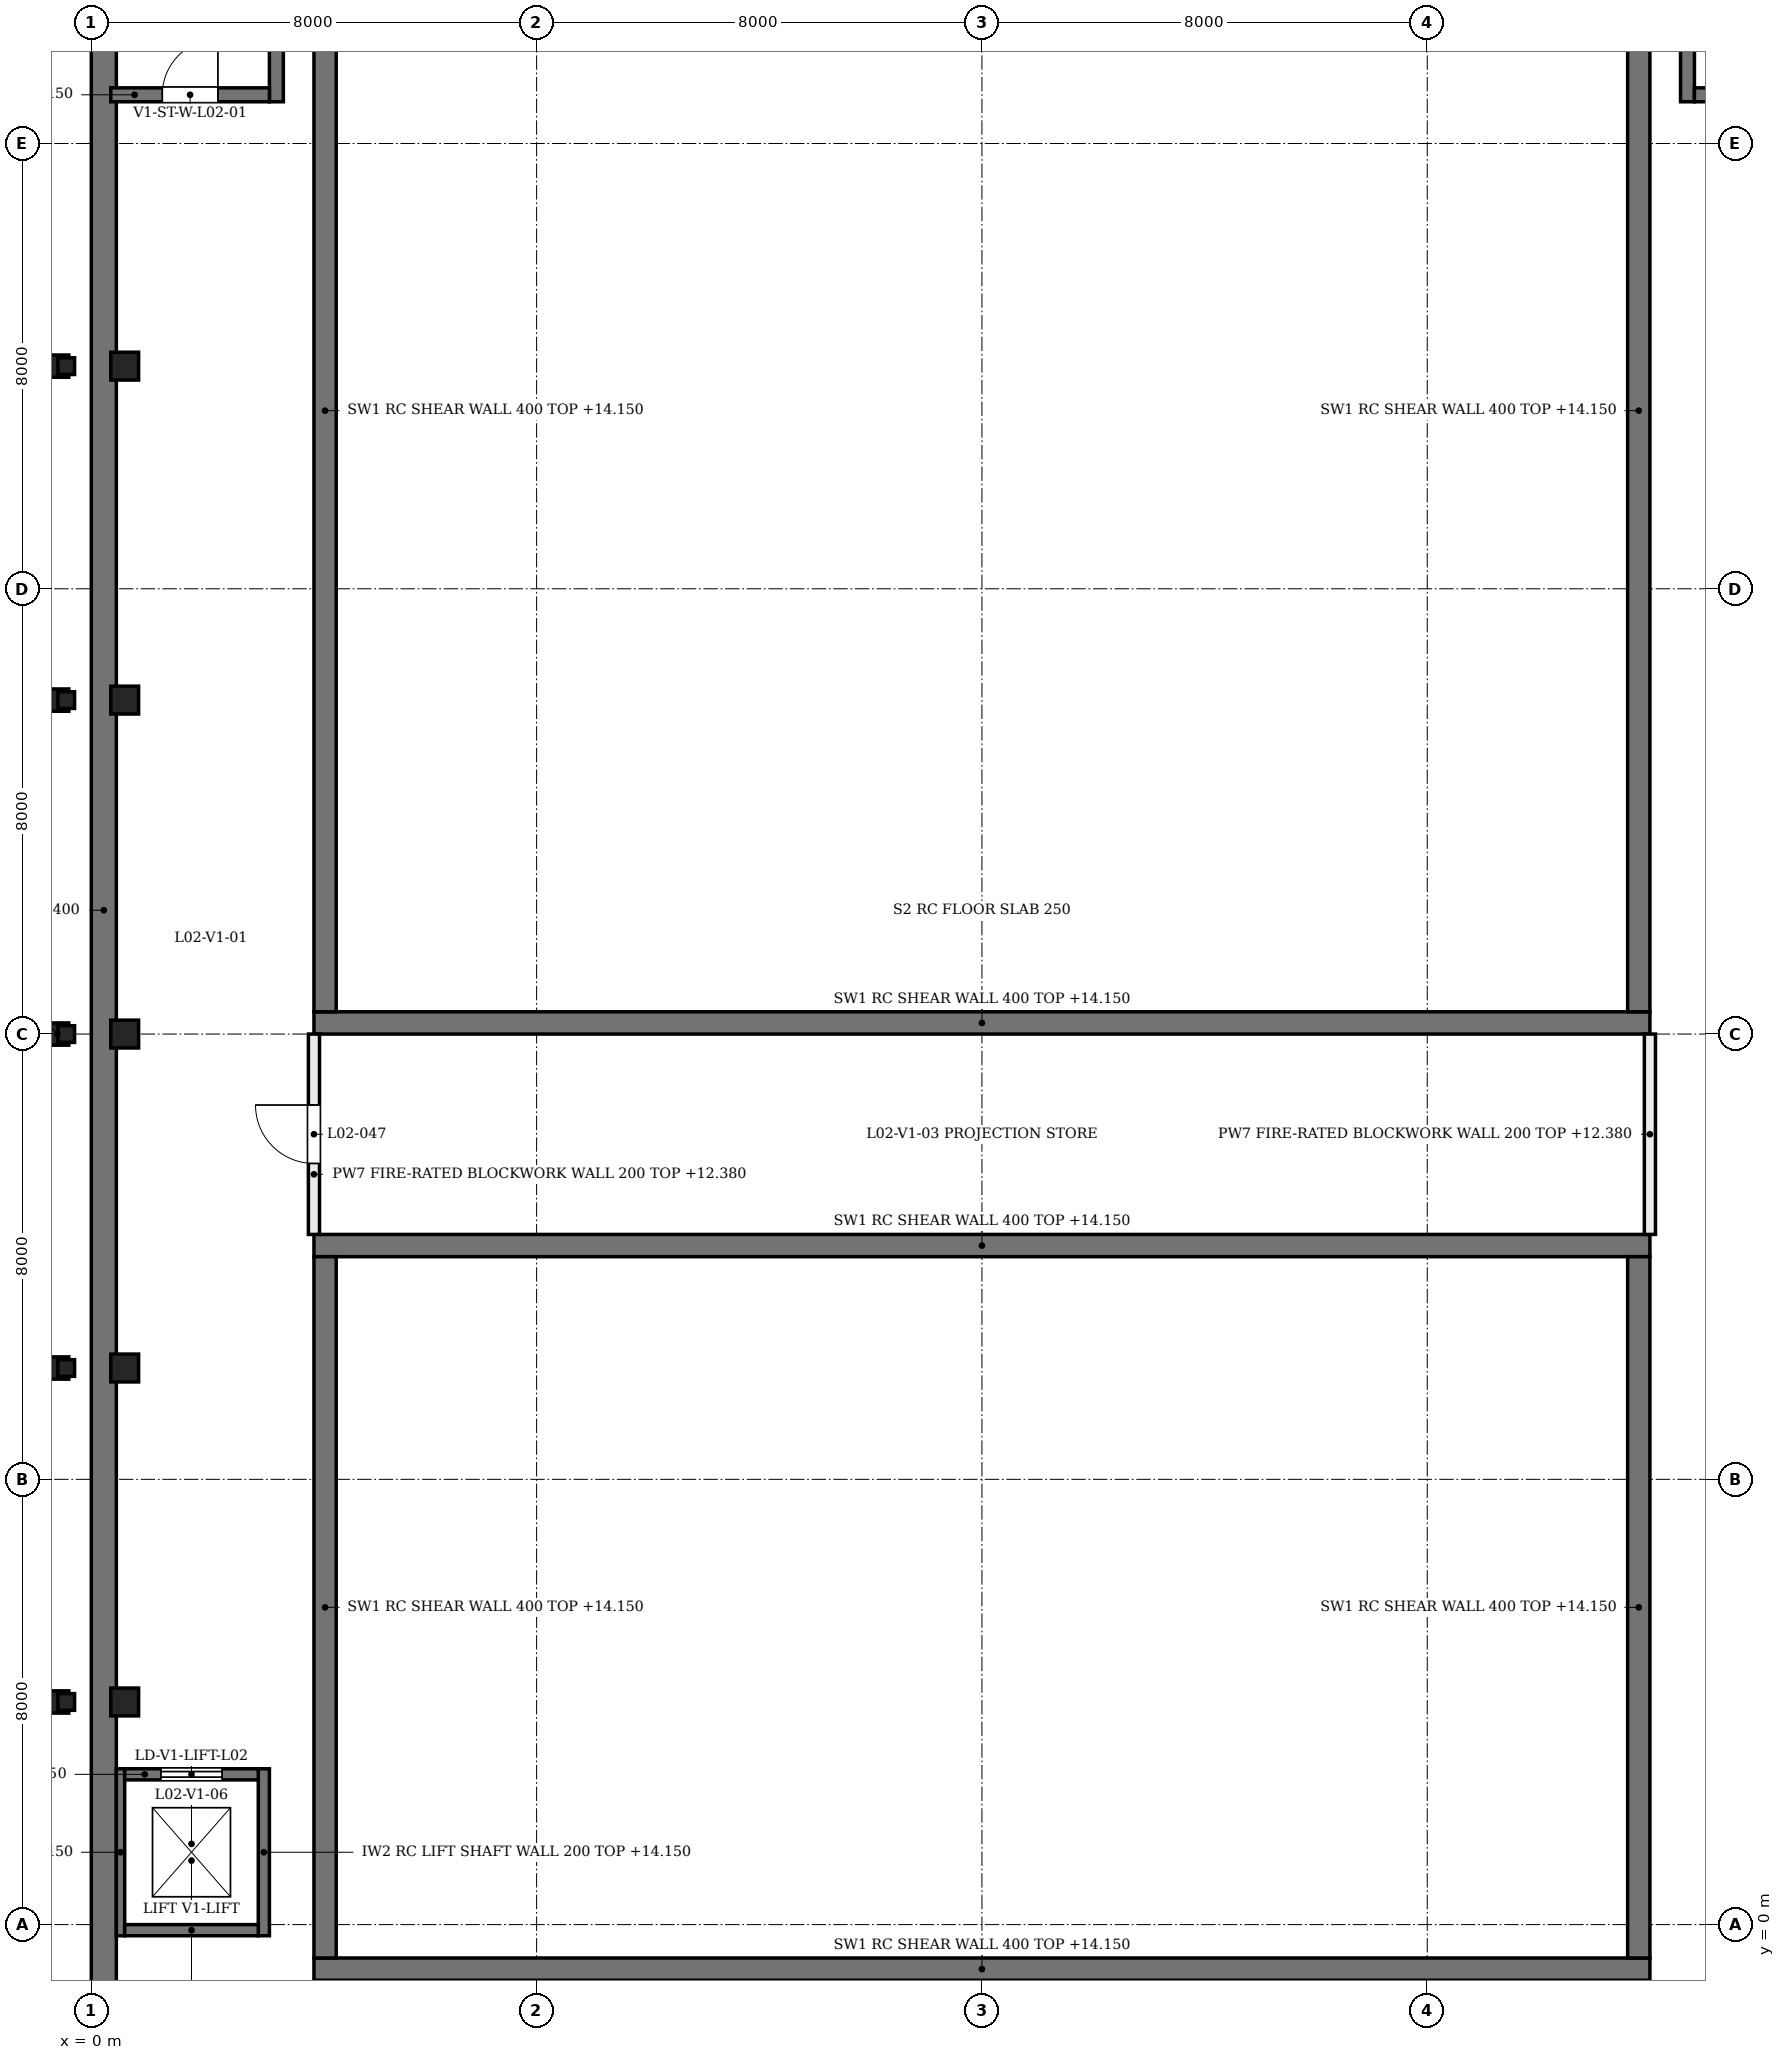
"""IFC4 building model, lengths in metres.
Left out: names, types, materials, properties, quantities, classifications, styles, units other than length and angle.
Written with IfcOpenShell. Run it as: python <this file> out.ifc"""

import sys

from ifc_helpers import new_model, si_unit, direction, frame, frame_2d, origin, origin_2d, place, context, subcontext, project, spatial, rectangle, hollow_rectangle, extrude, element, fill, save


model = new_model("IFC4")
c1 = context("Model", 3, precision=1e-05, world=origin(), true_north=direction((0.0, 1.0)))
c2 = subcontext(c1, "Body", "Model", "MODEL_VIEW")
j1 = project(units=[si_unit("LENGTHUNIT", "METRE"), si_unit("PLANEANGLEUNIT", "RADIAN")], contexts=[c1])
p1 = place(None, origin())
s1 = spatial("IfcSite", under=j1, at=p1, CompositionType="ELEMENT")
p2 = place(p1, origin())
s2 = spatial("IfcBuilding", under=s1, at=p2, CompositionType="ELEMENT")
p3 = place(p2, frame((0.0, 0.0, 9.6)))
s3 = spatial("IfcBuildingStorey", under=s2, at=p3, CompositionType="ELEMENT", Elevation=9.6)
p4 = place(p3, frame((4.0, 16.2, 0.0), z_axis=(0.0, 0.0, 1.0), x_axis=(1.0, 0.0, 0.0)))
e1 = element("IfcWall", 1, at=p4, inside=s3, PredefinedType="SHEAR", context=c2, shape_type="SweptSolid", body=[
    extrude(rectangle(XDim=24.0, YDim=0.4, at=frame_2d((12.0, 0.0))), origin(), (0.0, 0.0, 1.0), 4.55),
])
for number, where, z_axis, x_axis in (
    (2, (4.2, 16.4, 0.0), (0.0, 0.0, 1.0), (0.0, 1.0, 0.0)),
    (3, (27.8, 16.4, 0.0), (0.0, 0.0, 1.0), (0.0, 1.0, 0.0)),
):
    element("IfcWall", number, at=place(p3, frame(where, z_axis=z_axis, x_axis=x_axis)), inside=s3, PredefinedType="SHEAR", context=c2, shape_type="SweptSolid", body=[
        extrude(rectangle(XDim=22.6, YDim=0.4, at=frame_2d((11.3, 0.0))), origin(), (0.0, 0.0, 1.0), 4.55),
    ])
for number, where, z_axis, x_axis in (
    (4, (4.0, -0.8, 0.0), (0.0, 0.0, 1.0), (1.0, 0.0, 0.0)),
    (5, (4.0, 12.2, 0.0), (0.0, 0.0, 1.0), (1.0, 0.0, 0.0)),
):
    element("IfcWall", number, at=place(p3, frame(where, z_axis=z_axis, x_axis=x_axis)), inside=s3, PredefinedType="SHEAR", context=c2, shape_type="SweptSolid", body=[
        extrude(rectangle(XDim=24.0, YDim=0.4, at=frame_2d((12.0, 0.0))), origin(), (0.0, 0.0, 1.0), 4.55),
    ])
for number, where, z_axis, x_axis in (
    (6, (4.2, -0.6, 0.0), (0.0, 0.0, 1.0), (0.0, 1.0, 0.0)),
    (7, (27.8, -0.6, 0.0), (0.0, 0.0, 1.0), (0.0, 1.0, 0.0)),
):
    element("IfcWall", number, at=place(p3, frame(where, z_axis=z_axis, x_axis=x_axis)), inside=s3, PredefinedType="SHEAR", context=c2, shape_type="SweptSolid", body=[
        extrude(rectangle(XDim=12.6, YDim=0.4, at=frame_2d((6.3, 0.0))), origin(), (0.0, 0.0, 1.0), 4.55),
    ])
for number, where, z_axis, x_axis in (
    (8, (0.6, 4.0, 0.0), (0.0, 0.0, 1.0), (1.0, 0.0, 0.0)),
    (9, (0.6, 10.0, 0.0), (0.0, 0.0, 1.0), (1.0, 0.0, 0.0)),
    (10, (0.6, 16.0, 0.0), (0.0, 0.0, 1.0), (1.0, 0.0, 0.0)),
    (11, (0.6, 22.0, 0.0), (0.0, 0.0, 1.0), (1.0, 0.0, 0.0)),
    (12, (0.6, 28.0, 0.0), (0.0, 0.0, 1.0), (1.0, 0.0, 0.0)),
):
    element("IfcColumn", number, at=place(p3, frame(where, z_axis=z_axis, x_axis=x_axis)), inside=s3, PredefinedType="COLUMN", context=c2, shape_type="SweptSolid", body=[
        extrude(rectangle(XDim=0.5, YDim=0.5, at=origin_2d()), origin(), (0.0, 0.0, 1.0), 4.55),
    ])
p5 = place(p3, frame((-0.726, 4.0, 0.0), z_axis=(0.100917941267, 0.0, 0.994894752791), x_axis=(0.0, 1.0, 0.0)))
e13 = element("IfcColumn", 13, at=p5, inside=s3, PredefinedType="COLUMN", context=c2, shape_type="SweptSolid", body=[
    extrude(hollow_rectangle(XDim=0.4, YDim=0.4, WallThickness=0.012, InnerFilletRadius=0.012, OuterFilletRadius=0.019, at=origin_2d()), origin(), (0.0, 0.0, 1.0), 4.221),
])
p6 = place(p3, frame((-0.45, 4.0, 4.22), z_axis=(0.0, 0.0, 1.0), x_axis=(1.0, 0.0, 0.0)))
e14 = element("IfcColumn", 14, at=p6, inside=s3, PredefinedType="COLUMN", context=c2, shape_type="SweptSolid", body=[
    extrude(hollow_rectangle(XDim=0.3, YDim=0.3, WallThickness=0.012, InnerFilletRadius=0.012, OuterFilletRadius=0.019, at=origin_2d()), origin(), (0.0, 0.0, 1.0), 0.579),
])
p7 = place(p3, frame((-0.726, 10.0, 0.0), z_axis=(0.100917941267, 0.0, 0.994894752791), x_axis=(0.0, 1.0, 0.0)))
e15 = element("IfcColumn", 15, at=p7, inside=s3, PredefinedType="COLUMN", context=c2, shape_type="SweptSolid", body=[
    extrude(hollow_rectangle(XDim=0.4, YDim=0.4, WallThickness=0.012, InnerFilletRadius=0.012, OuterFilletRadius=0.019, at=origin_2d()), origin(), (0.0, 0.0, 1.0), 4.221),
])
p8 = place(p3, frame((-0.45, 10.0, 4.22), z_axis=(0.0, 0.0, 1.0), x_axis=(1.0, 0.0, 0.0)))
e16 = element("IfcColumn", 16, at=p8, inside=s3, PredefinedType="COLUMN", context=c2, shape_type="SweptSolid", body=[
    extrude(hollow_rectangle(XDim=0.3, YDim=0.3, WallThickness=0.012, InnerFilletRadius=0.012, OuterFilletRadius=0.019, at=origin_2d()), origin(), (0.0, 0.0, 1.0), 0.579),
])
p9 = place(p3, frame((-0.726, 16.0, 0.0), z_axis=(0.100917941267, 0.0, 0.994894752791), x_axis=(0.0, 1.0, 0.0)))
e17 = element("IfcColumn", 17, at=p9, inside=s3, PredefinedType="COLUMN", context=c2, shape_type="SweptSolid", body=[
    extrude(hollow_rectangle(XDim=0.4, YDim=0.4, WallThickness=0.012, InnerFilletRadius=0.012, OuterFilletRadius=0.019, at=origin_2d()), origin(), (0.0, 0.0, 1.0), 4.221),
])
p10 = place(p3, frame((-0.45, 16.0, 4.22), z_axis=(0.0, 0.0, 1.0), x_axis=(1.0, 0.0, 0.0)))
e18 = element("IfcColumn", 18, at=p10, inside=s3, PredefinedType="COLUMN", context=c2, shape_type="SweptSolid", body=[
    extrude(hollow_rectangle(XDim=0.3, YDim=0.3, WallThickness=0.012, InnerFilletRadius=0.012, OuterFilletRadius=0.019, at=origin_2d()), origin(), (0.0, 0.0, 1.0), 0.579),
])
p11 = place(p3, frame((-0.726, 22.0, 0.0), z_axis=(0.100917941267, 0.0, 0.994894752791), x_axis=(0.0, 1.0, 0.0)))
e19 = element("IfcColumn", 19, at=p11, inside=s3, PredefinedType="COLUMN", context=c2, shape_type="SweptSolid", body=[
    extrude(hollow_rectangle(XDim=0.4, YDim=0.4, WallThickness=0.012, InnerFilletRadius=0.012, OuterFilletRadius=0.019, at=origin_2d()), origin(), (0.0, 0.0, 1.0), 4.221),
])
p12 = place(p3, frame((-0.45, 22.0, 4.22), z_axis=(0.0, 0.0, 1.0), x_axis=(1.0, 0.0, 0.0)))
e20 = element("IfcColumn", 20, at=p12, inside=s3, PredefinedType="COLUMN", context=c2, shape_type="SweptSolid", body=[
    extrude(hollow_rectangle(XDim=0.3, YDim=0.3, WallThickness=0.012, InnerFilletRadius=0.012, OuterFilletRadius=0.019, at=origin_2d()), origin(), (0.0, 0.0, 1.0), 0.579),
])
p13 = place(p3, frame((-0.726, 28.0, 0.0), z_axis=(0.100917941267, 0.0, 0.994894752791), x_axis=(0.0, 1.0, 0.0)))
e21 = element("IfcColumn", 21, at=p13, inside=s3, PredefinedType="COLUMN", context=c2, shape_type="SweptSolid", body=[
    extrude(hollow_rectangle(XDim=0.4, YDim=0.4, WallThickness=0.012, InnerFilletRadius=0.012, OuterFilletRadius=0.019, at=origin_2d()), origin(), (0.0, 0.0, 1.0), 4.221),
])
p14 = place(p3, frame((-0.45, 28.0, 4.22), z_axis=(0.0, 0.0, 1.0), x_axis=(1.0, 0.0, 0.0)))
e22 = element("IfcColumn", 22, at=p14, inside=s3, PredefinedType="COLUMN", context=c2, shape_type="SweptSolid", body=[
    extrude(hollow_rectangle(XDim=0.3, YDim=0.3, WallThickness=0.012, InnerFilletRadius=0.012, OuterFilletRadius=0.019, at=origin_2d()), origin(), (0.0, 0.0, 1.0), 0.579),
])
p15 = place(p3, frame((0.225, -1.55, 0.0), z_axis=(0.0, 0.0, 1.0), x_axis=(0.0, 1.0, 0.0)))
e23 = element("IfcWall", 23, at=p15, inside=s3, PredefinedType="SOLIDWALL", context=c2, shape_type="SweptSolid", body=[
    extrude(rectangle(XDim=41.1, YDim=0.45, at=frame_2d((20.55, 0.0))), origin(), (0.0, 0.0, 1.0), 4.8),
])
p16 = place(p3, frame((3.325, 32.75, 0.0), z_axis=(0.0, 0.0, 1.0), x_axis=(0.0, 1.0, 0.0)))
e24 = element("IfcWall", 24, at=p16, inside=s3, PredefinedType="SOLIDWALL", context=c2, shape_type="SweptSolid", body=[
    extrude(rectangle(XDim=6.8, YDim=0.25, at=frame_2d((3.4, 0.0))), origin(), (0.0, 0.0, 1.0), 4.55),
])
p17 = place(p3, frame((0.35, 32.875, 0.0), z_axis=(0.0, 0.0, 1.0), x_axis=(1.0, 0.0, 0.0)))
e25 = element("IfcWall", 25, at=p17, inside=s3, PredefinedType="SOLIDWALL", context=c2, shape_type="SweptSolid", body=[
    extrude(rectangle(XDim=2.85, YDim=0.25, at=frame_2d((1.425, 0.0))), origin(), (0.0, 0.0, 1.0), 4.55),
])
p18 = place(p17, frame((0.925, 0.0, 0.0)))
e26 = element("IfcOpeningElement", 26, at=p18, cuts=e25, PredefinedType="OPENING", context=c2, shape_type="SweptSolid", body=[
    extrude(rectangle(XDim=1.0, YDim=2.1, at=frame_2d((0.5, 1.05))), frame((0.0, 0.135, 0.0), z_axis=(0.0, -1.0, 0.0), x_axis=(1.0, 0.0, 0.0)), (0.0, 0.0, 1.0), 0.27),
])
p19 = place(p3, frame((28.675, 32.75, 0.0), z_axis=(0.0, 0.0, 1.0), x_axis=(0.0, 1.0, 0.0)))
e27 = element("IfcWall", 27, at=p19, inside=s3, PredefinedType="SOLIDWALL", context=c2, shape_type="SweptSolid", body=[
    extrude(rectangle(XDim=6.8, YDim=0.25, at=frame_2d((3.4, 0.0))), origin(), (0.0, 0.0, 1.0), 4.55),
])
p20 = place(p3, frame((28.8, 32.875, 0.0), z_axis=(0.0, 0.0, 1.0), x_axis=(1.0, 0.0, 0.0)))
e28 = element("IfcWall", 28, at=p20, inside=s3, PredefinedType="SOLIDWALL", context=c2, shape_type="SweptSolid", body=[
    extrude(rectangle(XDim=2.85, YDim=0.25, at=frame_2d((1.425, 0.0))), origin(), (0.0, 0.0, 1.0), 4.55),
])
p21 = place(p20, frame((0.925, 0.0, 0.0)))
e29 = element("IfcOpeningElement", 29, at=p21, cuts=e28, PredefinedType="OPENING", context=c2, shape_type="SweptSolid", body=[
    extrude(rectangle(XDim=1.0, YDim=2.1, at=frame_2d((0.5, 1.05))), frame((0.0, 0.135, 0.0), z_axis=(0.0, -1.0, 0.0), x_axis=(1.0, 0.0, 0.0)), (0.0, 0.0, 1.0), 0.27),
])
p22 = place(p3, frame((0.525, -0.2, 0.0), z_axis=(0.0, 0.0, 1.0), x_axis=(0.0, 1.0, 0.0)))
e30 = element("IfcWall", 30, at=p22, inside=s3, PredefinedType="SOLIDWALL", context=c2, shape_type="SweptSolid", body=[
    extrude(rectangle(XDim=3.0, YDim=0.15, at=frame_2d((1.5, 0.0))), origin(), (0.0, 0.0, 1.0), 4.55),
])
p23 = place(p3, frame((3.1, -0.2, 0.0), z_axis=(0.0, 0.0, 1.0), x_axis=(0.0, 1.0, 0.0)))
e31 = element("IfcWall", 31, at=p23, inside=s3, PredefinedType="SOLIDWALL", context=c2, shape_type="SweptSolid", body=[
    extrude(rectangle(XDim=3.0, YDim=0.2, at=frame_2d((1.5, 0.0))), origin(), (0.0, 0.0, 1.0), 4.55),
])
p24 = place(p3, frame((0.6, -0.1, 0.0), z_axis=(0.0, 0.0, 1.0), x_axis=(1.0, 0.0, 0.0)))
e32 = element("IfcWall", 32, at=p24, inside=s3, PredefinedType="SOLIDWALL", context=c2, shape_type="SweptSolid", body=[
    extrude(rectangle(XDim=2.4, YDim=0.2, at=frame_2d((1.2, 0.0))), origin(), (0.0, 0.0, 1.0), 4.55),
])
p25 = place(p3, frame((0.6, 2.7, 0.0), z_axis=(0.0, 0.0, 1.0), x_axis=(1.0, 0.0, 0.0)))
e33 = element("IfcWall", 33, at=p25, inside=s3, PredefinedType="SOLIDWALL", context=c2, shape_type="SweptSolid", body=[
    extrude(rectangle(XDim=2.4, YDim=0.2, at=frame_2d((1.2, 0.0))), origin(), (0.0, 0.0, 1.0), 4.55),
])
p26 = place(p25, frame((0.65, 0.0, 0.0)))
e34 = element("IfcOpeningElement", 34, at=p26, cuts=e33, PredefinedType="OPENING", context=c2, shape_type="SweptSolid", body=[
    extrude(rectangle(XDim=1.1, YDim=2.1, at=frame_2d((0.55, 1.05))), frame((0.0, 0.11, 0.0), z_axis=(0.0, -1.0, 0.0), x_axis=(1.0, 0.0, 0.0)), (0.0, 0.0, 1.0), 0.22),
])
p27 = place(p3, frame((4.0, 12.4, 0.0), z_axis=(0.0, 0.0, 1.0), x_axis=(0.0, 1.0, 0.0)))
e35 = element("IfcWall", 35, at=p27, inside=s3, PredefinedType="PARTITIONING", context=c2, shape_type="SweptSolid", body=[
    extrude(rectangle(XDim=3.6, YDim=0.2, at=frame_2d((1.8, 0.0))), origin(), (0.0, 0.0, 1.0), 2.78),
])
p28 = place(p27, frame((1.275, 0.0, 0.0)))
e36 = element("IfcOpeningElement", 36, at=p28, cuts=e35, PredefinedType="OPENING", context=c2, shape_type="SweptSolid", body=[
    extrude(rectangle(XDim=1.05, YDim=2.1, at=frame_2d((0.525, 1.05))), frame((0.0, 0.11, 0.0), z_axis=(0.0, -1.0, 0.0), x_axis=(1.0, 0.0, 0.0)), (0.0, 0.0, 1.0), 0.22),
])
p29 = place(p3, frame((28.0, 12.4, 0.0), z_axis=(0.0, 0.0, 1.0), x_axis=(0.0, 1.0, 0.0)))
e37 = element("IfcWall", 37, at=p29, inside=s3, PredefinedType="PARTITIONING", context=c2, shape_type="SweptSolid", body=[
    extrude(rectangle(XDim=3.6, YDim=0.2, at=frame_2d((1.8, 0.0))), origin(), (0.0, 0.0, 1.0), 2.78),
])
p30 = place(p2, frame((0.0, 0.0, 4.8)))
s4 = spatial("IfcBuildingStorey", under=s2, at=p30, CompositionType="ELEMENT", Elevation=4.8)
p31 = place(p30, frame((4.6, -0.6, 0.0), z_axis=(0.0, 0.0, 1.0), x_axis=(0.0, 1.0, 0.0)))
e38 = element("IfcWall", 38, at=p31, inside=s4, PredefinedType="PARTITIONING", context=c2, shape_type="SweptSolid", body=[
    extrude(rectangle(XDim=12.6, YDim=0.3, at=frame_2d((6.3, 0.0))), origin(), (0.0, 0.0, 1.0), 6.95),
])
p32 = place(p18, frame((1.0, 0.0, 0.0), z_axis=(0.0, 0.0, 1.0), x_axis=(-1.0, 0.0, 0.0)))
e39 = element("IfcDoor", 39, at=p32, inside=s3, OperationType="SINGLE_SWING_RIGHT", PredefinedType="DOOR", context=c2, shape_type="SweptSolid", body=[
    extrude(rectangle(XDim=1.0, YDim=2.1, at=frame_2d((0.5, 1.05))), frame((0.0, 0.025, 0.0), z_axis=(0.0, -1.0, 0.0), x_axis=(1.0, 0.0, 0.0)), (0.0, 0.0, 1.0), 0.05),
])
fill(e26, e39)
p33 = place(p26, origin())
e40 = element("IfcDoor", 40, at=p33, inside=s3, OperationType="DOUBLE_DOOR_SLIDING", PredefinedType="DOOR", context=c2, shape_type="SweptSolid", body=[
    extrude(rectangle(XDim=1.1, YDim=2.1, at=frame_2d((0.55, 1.05))), frame((0.0, 0.025, 0.0), z_axis=(0.0, -1.0, 0.0), x_axis=(1.0, 0.0, 0.0)), (0.0, 0.0, 1.0), 0.05),
])
fill(e34, e40)
p34 = place(p28, frame((1.05, 0.0, 0.0), z_axis=(0.0, 0.0, 1.0), x_axis=(-1.0, 0.0, 0.0)))
e41 = element("IfcDoor", 41, at=p34, inside=s3, OperationType="SINGLE_SWING_RIGHT", PredefinedType="DOOR", context=c2, shape_type="SweptSolid", body=[
    extrude(rectangle(XDim=1.05, YDim=2.1, at=frame_2d((0.525, 1.05))), frame((0.0, 0.025, 0.0), z_axis=(0.0, -1.0, 0.0), x_axis=(1.0, 0.0, 0.0)), (0.0, 0.0, 1.0), 0.05),
])
fill(e36, e41)
save(model, sys.argv[1])
